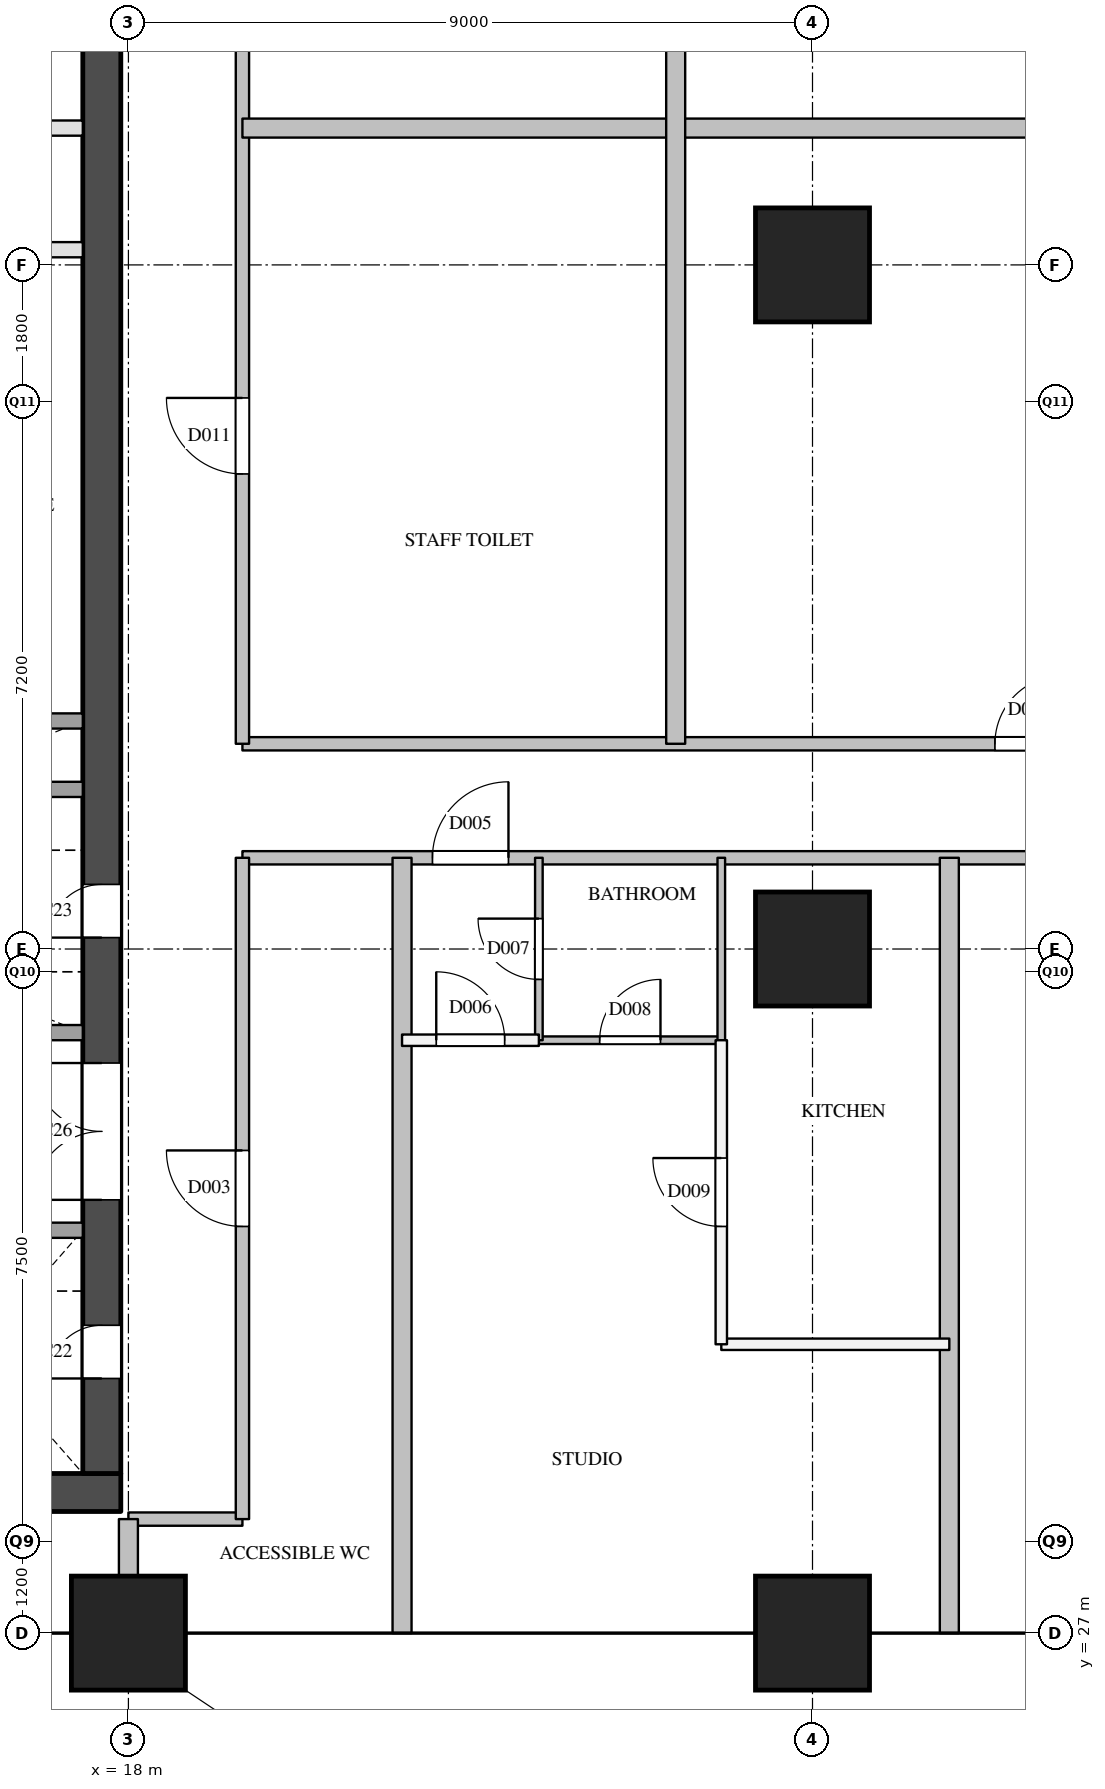
"""IFC4 building model, lengths in metres.
Left out: names, types, materials, properties, quantities, classifications, styles, units other than length and angle.
Written with IfcOpenShell. Run it as: python <this file> out.ifc"""

import sys

from ifc_helpers import new_model, si_unit, direction, frame, frame_2d, origin, origin_2d, place, context, subcontext, project, spatial, rectangle, extrude, element, fill, save


model = new_model("IFC4")
c1 = context("Model", 3, precision=1e-05, world=origin(), true_north=direction((0.0, 1.0)))
c2 = subcontext(c1, "Body", "Model", "MODEL_VIEW")
j1 = project(units=[si_unit("LENGTHUNIT", "METRE"), si_unit("PLANEANGLEUNIT", "RADIAN")], contexts=[c1])
p1 = place(None, origin())
s1 = spatial("IfcSite", under=j1, at=p1, CompositionType="ELEMENT")
p2 = place(p1, origin())
s2 = spatial("IfcBuilding", under=s1, at=p2, CompositionType="ELEMENT")
p3 = place(p2, frame((0.0, 0.0, 146.6)))
s3 = spatial("IfcBuildingStorey", under=s2, at=p3, CompositionType="ELEMENT", Elevation=146.6)
for number, where, z_axis, x_axis in (
    (1, (18.0, 27.0, 0.0), (0.0, 0.0, 1.0), (1.0, 0.0, 0.0)),
    (2, (27.0, 27.0, 0.0), (0.0, 0.0, 1.0), (1.0, 0.0, 0.0)),
    (3, (27.0, 36.0, 0.0), (0.0, 0.0, 1.0), (1.0, 0.0, 0.0)),
    (4, (27.0, 45.0, 0.0), (0.0, 0.0, 1.0), (1.0, 0.0, 0.0)),
):
    element("IfcColumn", number, at=place(p3, frame(where, z_axis=z_axis, x_axis=x_axis)), inside=s3, PredefinedType="COLUMN", context=c2, shape_type="SweptSolid", body=[
        extrude(rectangle(XDim=1.5, YDim=1.5, at=origin_2d()), origin(), (0.0, 0.0, 1.0), 3.9),
    ])
p4 = place(p3, frame((5.7, 28.85, 0.0), z_axis=(0.0, 0.0, 1.0), x_axis=(1.0, 0.0, 0.0)))
e5 = element("IfcWall", 5, at=p4, inside=s3, PredefinedType="SHEAR", context=c2, shape_type="SweptSolid", body=[
    extrude(rectangle(XDim=12.2, YDim=0.5, at=frame_2d((6.1, 0.0))), origin(), (0.0, 0.0, 1.0), 3.6),
])
p5 = place(p4, frame((9.35, 0.0, 0.0)))
e6 = element("IfcOpeningElement", 6, at=p5, cuts=e5, PredefinedType="OPENING", context=c2, shape_type="SweptSolid", body=[
    extrude(rectangle(XDim=1.2, YDim=2.1, at=frame_2d((0.6, 1.05))), frame((0.0, 0.26, 0.0), z_axis=(0.0, -1.0, 0.0), x_axis=(1.0, 0.0, 0.0)), (0.0, 0.0, 1.0), 0.52),
])
p6 = place(p3, frame((17.65, 29.1, 0.0), z_axis=(0.0, 0.0, 1.0), x_axis=(0.0, 1.0, 0.0)))
e7 = element("IfcWall", 7, at=p6, inside=s3, PredefinedType="SHEAR", context=c2, shape_type="SweptSolid", body=[
    extrude(rectangle(XDim=20.3, YDim=0.5, at=frame_2d((10.15, 0.0))), origin(), (0.0, 0.0, 1.0), 3.6),
])
p7 = place(p6, frame((1.25, 0.0, 0.0)))
e8 = element("IfcOpeningElement", 8, at=p7, cuts=e7, PredefinedType="OPENING", context=c2, shape_type="SweptSolid", body=[
    extrude(rectangle(XDim=0.7, YDim=2.1, at=frame_2d((0.35, 1.05))), frame((0.0, 0.26, 0.0), z_axis=(0.0, -1.0, 0.0), x_axis=(1.0, 0.0, 0.0)), (0.0, 0.0, 1.0), 0.52),
])
p8 = place(p6, frame((7.05, 0.0, 0.0)))
e9 = element("IfcOpeningElement", 9, at=p8, cuts=e7, PredefinedType="OPENING", context=c2, shape_type="SweptSolid", body=[
    extrude(rectangle(XDim=0.7, YDim=2.1, at=frame_2d((0.35, 1.05))), frame((0.0, 0.26, 0.0), z_axis=(0.0, -1.0, 0.0), x_axis=(1.0, 0.0, 0.0)), (0.0, 0.0, 1.0), 0.52),
])
p9 = place(p6, frame((3.6, 0.0, 0.0)))
e10 = element("IfcOpeningElement", 10, at=p9, cuts=e7, PredefinedType="OPENING", context=c2, shape_type="SweptSolid", body=[
    extrude(rectangle(XDim=1.8, YDim=2.1, at=frame_2d((0.9, 1.05))), frame((0.0, 0.26, 0.0), z_axis=(0.0, -1.0, 0.0), x_axis=(1.0, 0.0, 0.0)), (0.0, 0.0, 1.0), 0.52),
])
for number, where, z_axis, x_axis in (
    (11, (14.6, 32.3, 0.0), (0.0, 0.0, 1.0), (1.0, 0.0, 0.0)),
    (12, (14.6, 34.9, 0.0), (0.0, 0.0, 1.0), (1.0, 0.0, 0.0)),
):
    element("IfcWall", number, at=place(p3, frame(where, z_axis=z_axis, x_axis=x_axis)), inside=s3, PredefinedType="SOLIDWALL", context=c2, shape_type="SweptSolid", body=[
        extrude(rectangle(XDim=2.8, YDim=0.2, at=frame_2d((1.4, 0.0))), origin(), (0.0, 0.0, 1.0), 3.6),
    ])
p10 = place(p3, frame((6.2, 38.1, 0.0), z_axis=(0.0, 0.0, 1.0), x_axis=(1.0, 0.0, 0.0)))
e13 = element("IfcWall", 13, at=p10, inside=s3, PredefinedType="SOLIDWALL", context=c2, shape_type="SweptSolid", body=[
    extrude(rectangle(XDim=11.2, YDim=0.2, at=frame_2d((5.6, 0.0))), origin(), (0.0, 0.0, 1.0), 3.6),
])
p11 = place(p10, frame((8.85, 0.0, 0.0)))
e14 = element("IfcOpeningElement", 14, at=p11, cuts=e13, PredefinedType="OPENING", context=c2, shape_type="SweptSolid", body=[
    extrude(rectangle(XDim=1.2, YDim=2.1, at=frame_2d((0.6, 1.05))), frame((0.0, 0.11, 0.0), z_axis=(0.0, -1.0, 0.0), x_axis=(1.0, 0.0, 0.0)), (0.0, 0.0, 1.0), 0.22),
])
p12 = place(p3, frame((12.5, 39.0, 0.0), z_axis=(0.0, 0.0, 1.0), x_axis=(1.0, 0.0, 0.0)))
e15 = element("IfcWall", 15, at=p12, inside=s3, PredefinedType="SOLIDWALL", context=c2, shape_type="SweptSolid", body=[
    extrude(rectangle(XDim=4.9, YDim=0.2, at=frame_2d((2.45, 0.0))), origin(), (0.0, 0.0, 1.0), 3.6),
])
p13 = place(p3, frame((12.5, 45.2, 0.0), z_axis=(0.0, 0.0, 1.0), x_axis=(1.0, 0.0, 0.0)))
e16 = element("IfcWall", 16, at=p13, inside=s3, PredefinedType="PARTITIONING", context=c2, shape_type="SweptSolid", body=[
    extrude(rectangle(XDim=4.9, YDim=0.2, at=frame_2d((2.45, 0.0))), origin(), (0.0, 0.0, 1.0), 3.6),
])
p14 = place(p13, frame((0.53, 0.0, 0.0)))
e17 = element("IfcOpeningElement", 17, at=p14, cuts=e16, PredefinedType="OPENING", context=c2, shape_type="SweptSolid", body=[
    extrude(rectangle(XDim=0.9, YDim=2.1, at=frame_2d((0.45, 1.05))), frame((0.0, 0.11, 0.0), z_axis=(0.0, -1.0, 0.0), x_axis=(1.0, 0.0, 0.0)), (0.0, 0.0, 1.0), 0.22),
])
p15 = place(p13, frame((2.98, 0.0, 0.0)))
e18 = element("IfcOpeningElement", 18, at=p15, cuts=e16, PredefinedType="OPENING", context=c2, shape_type="SweptSolid", body=[
    extrude(rectangle(XDim=0.9, YDim=2.1, at=frame_2d((0.45, 1.05))), frame((0.0, 0.11, 0.0), z_axis=(0.0, -1.0, 0.0), x_axis=(1.0, 0.0, 0.0)), (0.0, 0.0, 1.0), 0.22),
])
p16 = place(p3, frame((6.2, 46.8, 0.0), z_axis=(0.0, 0.0, 1.0), x_axis=(1.0, 0.0, 0.0)))
e19 = element("IfcWall", 19, at=p16, inside=s3, PredefinedType="PARTITIONING", context=c2, shape_type="SweptSolid", body=[
    extrude(rectangle(XDim=11.2, YDim=0.2, at=frame_2d((5.6, 0.0))), origin(), (0.0, 0.0, 1.0), 3.6),
])
p17 = place(p16, frame((1.23, 0.0, 0.0)))
e20 = element("IfcOpeningElement", 20, at=p17, cuts=e19, PredefinedType="OPENING", context=c2, shape_type="SweptSolid", body=[
    extrude(rectangle(XDim=0.9, YDim=2.1, at=frame_2d((0.45, 1.05))), frame((0.0, 0.11, 0.0), z_axis=(0.0, -1.0, 0.0), x_axis=(1.0, 0.0, 0.0)), (0.0, 0.0, 1.0), 0.22),
])
p18 = place(p16, frame((6.83, 0.0, 0.0)))
e21 = element("IfcOpeningElement", 21, at=p18, cuts=e19, PredefinedType="OPENING", context=c2, shape_type="SweptSolid", body=[
    extrude(rectangle(XDim=0.9, YDim=2.1, at=frame_2d((0.45, 1.05))), frame((0.0, 0.11, 0.0), z_axis=(0.0, -1.0, 0.0), x_axis=(1.0, 0.0, 0.0)), (0.0, 0.0, 1.0), 0.22),
])
p19 = place(p3, frame((18.0, 28.5, 0.0), z_axis=(0.0, 0.0, 1.0), x_axis=(1.0, 0.0, 0.0)))
e22 = element("IfcWall", 22, at=p19, inside=s3, PredefinedType="PARTITIONING", context=c2, shape_type="SweptSolid", body=[
    extrude(rectangle(XDim=1.5, YDim=0.175, at=frame_2d((0.75, 0.0))), origin(), (0.0, 0.0, 1.0), 3.6),
])
p20 = place(p3, frame((19.5, 37.2, 0.0), z_axis=(0.0, 0.0, 1.0), x_axis=(1.0, 0.0, 0.0)))
e23 = element("IfcWall", 23, at=p20, inside=s3, PredefinedType="PARTITIONING", context=c2, shape_type="SweptSolid", body=[
    extrude(rectangle(XDim=15.0, YDim=0.175, at=frame_2d((7.5, 0.0))), origin(), (0.0, 0.0, 1.0), 2.6),
])
p21 = place(p20, frame((2.5, 0.0, 0.0)))
e24 = element("IfcOpeningElement", 24, at=p21, cuts=e23, PredefinedType="OPENING", context=c2, shape_type="SweptSolid", body=[
    extrude(rectangle(XDim=1.0, YDim=2.1, at=frame_2d((0.5, 1.05))), frame((0.0, 0.097, 0.0), z_axis=(0.0, -1.0, 0.0), x_axis=(1.0, 0.0, 0.0)), (0.0, 0.0, 1.0), 0.195),
])
p22 = place(p3, frame((19.5, 38.7, 0.0), z_axis=(0.0, 0.0, 1.0), x_axis=(1.0, 0.0, 0.0)))
e25 = element("IfcWall", 25, at=p22, inside=s3, PredefinedType="PARTITIONING", context=c2, shape_type="SweptSolid", body=[
    extrude(rectangle(XDim=15.0, YDim=0.175, at=frame_2d((7.5, 0.0))), origin(), (0.0, 0.0, 1.0), 2.6),
])
p23 = place(p22, frame((9.9, 0.0, 0.0)))
e26 = element("IfcOpeningElement", 26, at=p23, cuts=e25, PredefinedType="OPENING", context=c2, shape_type="SweptSolid", body=[
    extrude(rectangle(XDim=0.9, YDim=2.1, at=frame_2d((0.45, 1.05))), frame((0.0, 0.097, 0.0), z_axis=(0.0, -1.0, 0.0), x_axis=(1.0, 0.0, 0.0)), (0.0, 0.0, 1.0), 0.195),
])
p24 = place(p3, frame((19.5, 28.5, 0.0), z_axis=(0.0, 0.0, 1.0), x_axis=(0.0, 1.0, 0.0)))
e27 = element("IfcWall", 27, at=p24, inside=s3, PredefinedType="PARTITIONING", context=c2, shape_type="SweptSolid", body=[
    extrude(rectangle(XDim=8.7, YDim=0.175, at=frame_2d((4.35, 0.0))), origin(), (0.0, 0.0, 1.0), 3.6),
])
p25 = place(p24, frame((3.85, 0.0, 0.0)))
e28 = element("IfcOpeningElement", 28, at=p25, cuts=e27, PredefinedType="OPENING", context=c2, shape_type="SweptSolid", body=[
    extrude(rectangle(XDim=1.0, YDim=2.1, at=frame_2d((0.5, 1.05))), frame((0.0, 0.097, 0.0), z_axis=(0.0, -1.0, 0.0), x_axis=(1.0, 0.0, 0.0)), (0.0, 0.0, 1.0), 0.195),
])
p26 = place(p3, frame((19.5, 38.7, 0.0), z_axis=(0.0, 0.0, 1.0), x_axis=(0.0, 1.0, 0.0)))
e29 = element("IfcWall", 29, at=p26, inside=s3, PredefinedType="PARTITIONING", context=c2, shape_type="SweptSolid", body=[
    extrude(rectangle(XDim=12.8, YDim=0.175, at=frame_2d((6.4, 0.0))), origin(), (0.0, 0.0, 1.0), 3.6),
])
p27 = place(p26, frame((3.55, 0.0, 0.0)))
e30 = element("IfcOpeningElement", 30, at=p27, cuts=e29, PredefinedType="OPENING", context=c2, shape_type="SweptSolid", body=[
    extrude(rectangle(XDim=1.0, YDim=2.1, at=frame_2d((0.5, 1.05))), frame((0.0, 0.097, 0.0), z_axis=(0.0, -1.0, 0.0), x_axis=(1.0, 0.0, 0.0)), (0.0, 0.0, 1.0), 0.195),
])
p28 = place(p26, frame((10.0, 0.0, 0.0)))
e31 = element("IfcOpeningElement", 31, at=p28, cuts=e29, PredefinedType="OPENING", context=c2, shape_type="SweptSolid", body=[
    extrude(rectangle(XDim=0.9, YDim=2.1, at=frame_2d((0.45, 1.05))), frame((0.0, 0.097, 0.0), z_axis=(0.0, -1.0, 0.0), x_axis=(1.0, 0.0, 0.0)), (0.0, 0.0, 1.0), 0.195),
])
p29 = place(p3, frame((25.8, 30.8, 0.0), z_axis=(0.0, 0.0, 1.0), x_axis=(1.0, 0.0, 0.0)))
e32 = element("IfcWall", 32, at=p29, inside=s3, PredefinedType="PARTITIONING", context=c2, shape_type="SweptSolid", body=[
    extrude(rectangle(XDim=3.0, YDim=0.15, at=frame_2d((1.5, 0.0))), origin(), (0.0, 0.0, 1.0), 2.6),
])
p30 = place(p3, frame((21.6, 34.8, 0.0), z_axis=(0.0, 0.0, 1.0), x_axis=(1.0, 0.0, 0.0)))
e33 = element("IfcWall", 33, at=p30, inside=s3, PredefinedType="PARTITIONING", context=c2, shape_type="SweptSolid", body=[
    extrude(rectangle(XDim=1.8, YDim=0.15, at=frame_2d((0.9, 0.0))), origin(), (0.0, 0.0, 1.0), 3.6),
])
p31 = place(p30, frame((0.45, 0.0, 0.0)))
e34 = element("IfcOpeningElement", 34, at=p31, cuts=e33, PredefinedType="OPENING", context=c2, shape_type="SweptSolid", body=[
    extrude(rectangle(XDim=0.9, YDim=2.1, at=frame_2d((0.45, 1.05))), frame((0.0, 0.085, 0.0), z_axis=(0.0, -1.0, 0.0), x_axis=(1.0, 0.0, 0.0)), (0.0, 0.0, 1.0), 0.17),
])
p32 = place(p3, frame((25.8, 30.8, 0.0), z_axis=(0.0, 0.0, 1.0), x_axis=(0.0, 1.0, 0.0)))
e35 = element("IfcWall", 35, at=p32, inside=s3, PredefinedType="PARTITIONING", context=c2, shape_type="SweptSolid", body=[
    extrude(rectangle(XDim=4.0, YDim=0.15, at=frame_2d((2.0, 0.0))), origin(), (0.0, 0.0, 1.0), 3.6),
])
p33 = place(p32, frame((1.55, 0.0, 0.0)))
e36 = element("IfcOpeningElement", 36, at=p33, cuts=e35, PredefinedType="OPENING", context=c2, shape_type="SweptSolid", body=[
    extrude(rectangle(XDim=0.9, YDim=2.1, at=frame_2d((0.45, 1.05))), frame((0.0, 0.085, 0.0), z_axis=(0.0, -1.0, 0.0), x_axis=(1.0, 0.0, 0.0)), (0.0, 0.0, 1.0), 0.17),
])
p34 = place(p3, frame((19.5, 46.8, 0.0), z_axis=(0.0, 0.0, 1.0), x_axis=(1.0, 0.0, 0.0)))
e37 = element("IfcWall", 37, at=p34, inside=s3, PredefinedType="PARTITIONING", context=c2, shape_type="SweptSolid", body=[
    extrude(rectangle(XDim=15.0, YDim=0.25, at=frame_2d((7.5, 0.0))), origin(), (0.0, 0.0, 1.0), 2.6),
])
p35 = place(p3, frame((18.0, 27.0, 0.0), z_axis=(0.0, 0.0, 1.0), x_axis=(0.0, 1.0, 0.0)))
e38 = element("IfcWall", 38, at=p35, inside=s3, PredefinedType="PARTITIONING", context=c2, shape_type="SweptSolid", body=[
    extrude(rectangle(XDim=1.5, YDim=0.25, at=frame_2d((0.75, 0.0))), origin(), (0.0, 0.0, 1.0), 3.6),
])
p36 = place(p3, frame((21.6, 27.0, 0.0), z_axis=(0.0, 0.0, 1.0), x_axis=(0.0, 1.0, 0.0)))
e39 = element("IfcWall", 39, at=p36, inside=s3, PredefinedType="PARTITIONING", context=c2, shape_type="SweptSolid", body=[
    extrude(rectangle(XDim=10.2, YDim=0.25, at=frame_2d((5.1, 0.0))), origin(), (0.0, 0.0, 1.0), 2.6),
])
p37 = place(p3, frame((25.2, 38.7, 0.0), z_axis=(0.0, 0.0, 1.0), x_axis=(0.0, 1.0, 0.0)))
e40 = element("IfcWall", 40, at=p37, inside=s3, PredefinedType="PARTITIONING", context=c2, shape_type="SweptSolid", body=[
    extrude(rectangle(XDim=15.3, YDim=0.25, at=frame_2d((7.65, 0.0))), origin(), (0.0, 0.0, 1.0), 2.6),
])
p38 = place(p3, frame((28.8, 27.0, 0.0), z_axis=(0.0, 0.0, 1.0), x_axis=(0.0, 1.0, 0.0)))
e41 = element("IfcWall", 41, at=p38, inside=s3, PredefinedType="PARTITIONING", context=c2, shape_type="SweptSolid", body=[
    extrude(rectangle(XDim=10.2, YDim=0.25, at=frame_2d((5.1, 0.0))), origin(), (0.0, 0.0, 1.0), 2.6),
])
p39 = place(p3, frame((23.4, 34.8, 0.0), z_axis=(0.0, 0.0, 1.0), x_axis=(1.0, 0.0, 0.0)))
e42 = element("IfcWall", 42, at=p39, inside=s3, PredefinedType="PARTITIONING", context=c2, shape_type="SweptSolid", body=[
    extrude(rectangle(XDim=2.4, YDim=0.1, at=frame_2d((1.2, 0.0))), origin(), (0.0, 0.0, 1.0), 3.6),
])
p40 = place(p39, frame((0.8, 0.0, 0.0)))
e43 = element("IfcOpeningElement", 43, at=p40, cuts=e42, PredefinedType="OPENING", context=c2, shape_type="SweptSolid", body=[
    extrude(rectangle(XDim=0.8, YDim=2.1, at=frame_2d((0.4, 1.05))), frame((0.0, 0.06, 0.0), z_axis=(0.0, -1.0, 0.0), x_axis=(1.0, 0.0, 0.0)), (0.0, 0.0, 1.0), 0.12),
])
p41 = place(p3, frame((23.4, 34.8, 0.0), z_axis=(0.0, 0.0, 1.0), x_axis=(0.0, 1.0, 0.0)))
e44 = element("IfcWall", 44, at=p41, inside=s3, PredefinedType="PARTITIONING", context=c2, shape_type="SweptSolid", body=[
    extrude(rectangle(XDim=2.4, YDim=0.1, at=frame_2d((1.2, 0.0))), origin(), (0.0, 0.0, 1.0), 3.6),
])
p42 = place(p41, frame((0.8, 0.0, 0.0)))
e45 = element("IfcOpeningElement", 45, at=p42, cuts=e44, PredefinedType="OPENING", context=c2, shape_type="SweptSolid", body=[
    extrude(rectangle(XDim=0.8, YDim=2.1, at=frame_2d((0.4, 1.05))), frame((0.0, 0.06, 0.0), z_axis=(0.0, -1.0, 0.0), x_axis=(1.0, 0.0, 0.0)), (0.0, 0.0, 1.0), 0.12),
])
p43 = place(p3, frame((25.8, 34.8, 0.0), z_axis=(0.0, 0.0, 1.0), x_axis=(0.0, 1.0, 0.0)))
e46 = element("IfcWall", 46, at=p43, inside=s3, PredefinedType="PARTITIONING", context=c2, shape_type="SweptSolid", body=[
    extrude(rectangle(XDim=2.4, YDim=0.1, at=frame_2d((1.2, 0.0))), origin(), (0.0, 0.0, 1.0), 3.6),
])
p44 = place(p7, origin())
e47 = element("IfcDoor", 47, at=p44, inside=s3, OperationType="SINGLE_SWING_LEFT", PredefinedType="DOOR", context=c2, shape_type="SweptSolid", body=[
    extrude(rectangle(XDim=0.7, YDim=2.1, at=frame_2d((0.35, 1.05))), frame((0.0, 0.025, 0.0), z_axis=(0.0, -1.0, 0.0), x_axis=(1.0, 0.0, 0.0)), (0.0, 0.0, 1.0), 0.05),
])
fill(e8, e47)
p45 = place(p8, origin())
e48 = element("IfcDoor", 48, at=p45, inside=s3, OperationType="SINGLE_SWING_LEFT", PredefinedType="DOOR", context=c2, shape_type="SweptSolid", body=[
    extrude(rectangle(XDim=0.7, YDim=2.1, at=frame_2d((0.35, 1.05))), frame((0.0, 0.025, 0.0), z_axis=(0.0, -1.0, 0.0), x_axis=(1.0, 0.0, 0.0)), (0.0, 0.0, 1.0), 0.05),
])
fill(e9, e48)
p46 = place(p9, origin())
e49 = element("IfcDoor", 49, at=p46, inside=s3, OperationType="DOUBLE_DOOR_SINGLE_SWING", PredefinedType="DOOR", context=c2, shape_type="SweptSolid", body=[
    extrude(rectangle(XDim=1.8, YDim=2.1, at=frame_2d((0.9, 1.05))), frame((0.0, 0.025, 0.0), z_axis=(0.0, -1.0, 0.0), x_axis=(1.0, 0.0, 0.0)), (0.0, 0.0, 1.0), 0.05),
])
fill(e10, e49)
p47 = place(p25, origin())
e50 = element("IfcDoor", 50, at=p47, inside=s3, OperationType="SINGLE_SWING_RIGHT", PredefinedType="DOOR", context=c2, shape_type="SweptSolid", body=[
    extrude(rectangle(XDim=1.0, YDim=2.1, at=frame_2d((0.5, 1.05))), frame((0.0, 0.025, 0.0), z_axis=(0.0, -1.0, 0.0), x_axis=(1.0, 0.0, 0.0)), (0.0, 0.0, 1.0), 0.05),
])
fill(e28, e50)
p48 = place(p21, origin())
e51 = element("IfcDoor", 51, at=p48, inside=s3, OperationType="SINGLE_SWING_RIGHT", PredefinedType="DOOR", context=c2, shape_type="SweptSolid", body=[
    extrude(rectangle(XDim=1.0, YDim=2.1, at=frame_2d((0.5, 1.05))), frame((0.0, 0.025, 0.0), z_axis=(0.0, -1.0, 0.0), x_axis=(1.0, 0.0, 0.0)), (0.0, 0.0, 1.0), 0.05),
])
fill(e24, e51)
p49 = place(p31, origin())
e52 = element("IfcDoor", 52, at=p49, inside=s3, OperationType="SINGLE_SWING_LEFT", PredefinedType="DOOR", context=c2, shape_type="SweptSolid", body=[
    extrude(rectangle(XDim=0.9, YDim=2.1, at=frame_2d((0.45, 1.05))), frame((0.0, 0.025, 0.0), z_axis=(0.0, -1.0, 0.0), x_axis=(1.0, 0.0, 0.0)), (0.0, 0.0, 1.0), 0.05),
])
fill(e34, e52)
p50 = place(p42, origin())
e53 = element("IfcDoor", 53, at=p50, inside=s3, OperationType="SINGLE_SWING_RIGHT", PredefinedType="DOOR", context=c2, shape_type="SweptSolid", body=[
    extrude(rectangle(XDim=0.8, YDim=2.1, at=frame_2d((0.4, 1.05))), frame((0.0, 0.025, 0.0), z_axis=(0.0, -1.0, 0.0), x_axis=(1.0, 0.0, 0.0)), (0.0, 0.0, 1.0), 0.05),
])
fill(e45, e53)
p51 = place(p40, origin())
e54 = element("IfcDoor", 54, at=p51, inside=s3, OperationType="SINGLE_SWING_RIGHT", PredefinedType="DOOR", context=c2, shape_type="SweptSolid", body=[
    extrude(rectangle(XDim=0.8, YDim=2.1, at=frame_2d((0.4, 1.05))), frame((0.0, 0.025, 0.0), z_axis=(0.0, -1.0, 0.0), x_axis=(1.0, 0.0, 0.0)), (0.0, 0.0, 1.0), 0.05),
])
fill(e43, e54)
p52 = place(p33, origin())
e55 = element("IfcDoor", 55, at=p52, inside=s3, OperationType="SINGLE_SWING_RIGHT", PredefinedType="DOOR", context=c2, shape_type="SweptSolid", body=[
    extrude(rectangle(XDim=0.9, YDim=2.1, at=frame_2d((0.45, 1.05))), frame((0.0, 0.025, 0.0), z_axis=(0.0, -1.0, 0.0), x_axis=(1.0, 0.0, 0.0)), (0.0, 0.0, 1.0), 0.05),
])
fill(e36, e55)
p53 = place(p27, origin())
e56 = element("IfcDoor", 56, at=p53, inside=s3, OperationType="SINGLE_SWING_RIGHT", PredefinedType="DOOR", context=c2, shape_type="SweptSolid", body=[
    extrude(rectangle(XDim=1.0, YDim=2.1, at=frame_2d((0.5, 1.05))), frame((0.0, 0.025, 0.0), z_axis=(0.0, -1.0, 0.0), x_axis=(1.0, 0.0, 0.0)), (0.0, 0.0, 1.0), 0.05),
])
fill(e30, e56)
p54 = place(p23, origin())
e57 = element("IfcDoor", 57, at=p54, inside=s3, OperationType="SINGLE_SWING_RIGHT", PredefinedType="DOOR", context=c2, shape_type="SweptSolid", body=[
    extrude(rectangle(XDim=0.9, YDim=2.1, at=frame_2d((0.45, 1.05))), frame((0.0, 0.025, 0.0), z_axis=(0.0, -1.0, 0.0), x_axis=(1.0, 0.0, 0.0)), (0.0, 0.0, 1.0), 0.05),
])
fill(e26, e57)
save(model, sys.argv[1])
